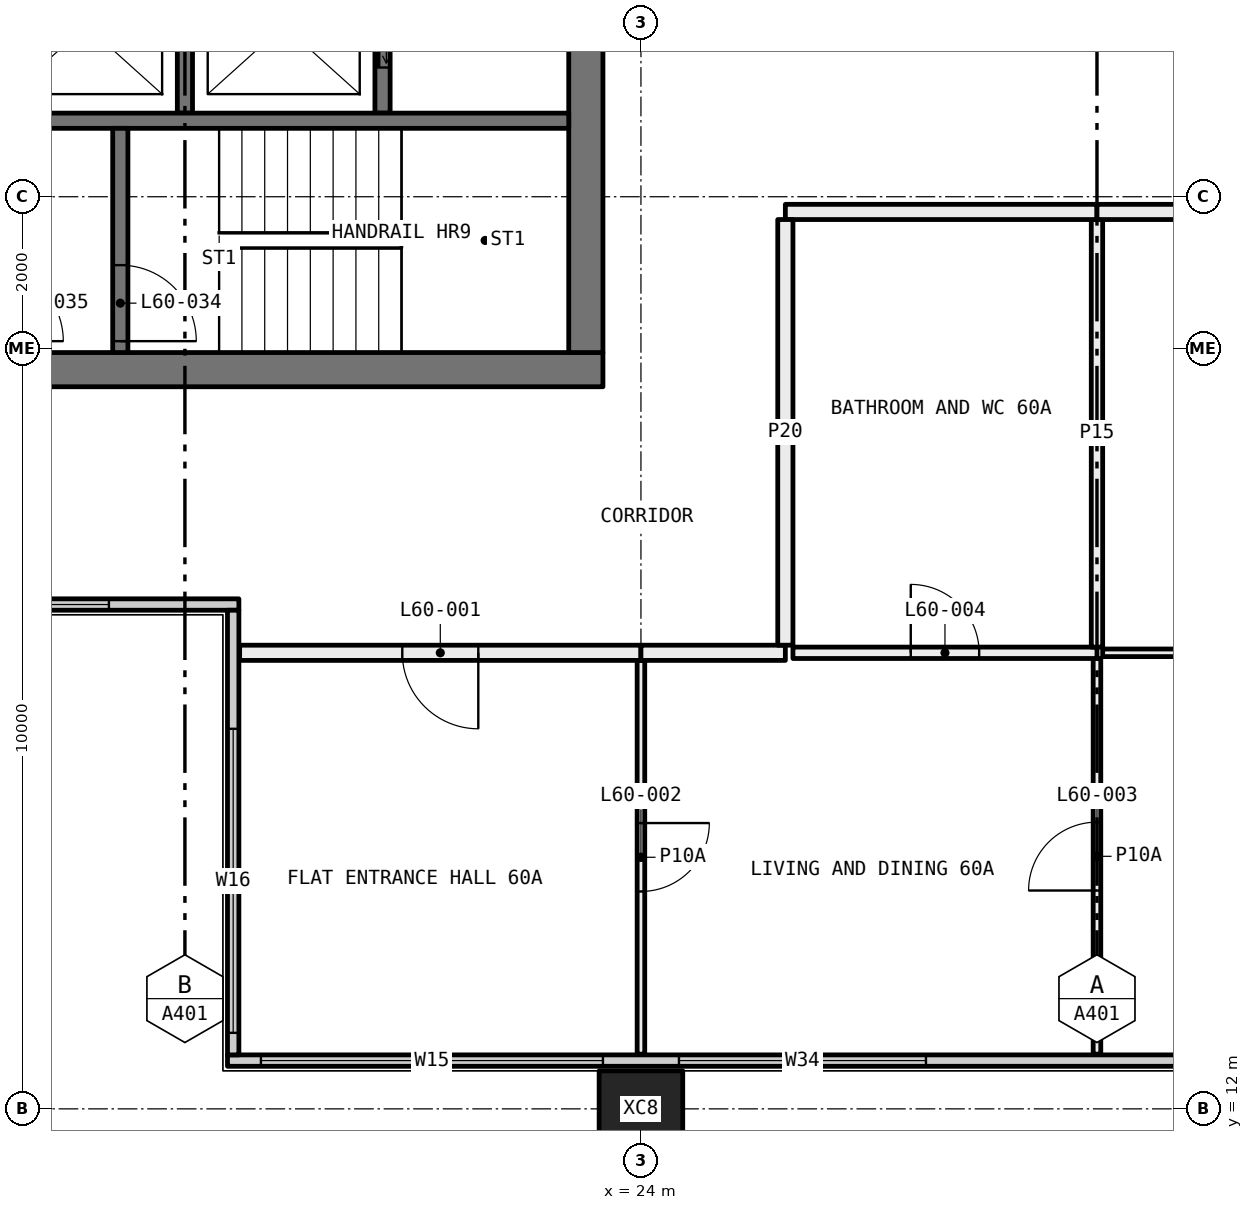
"""IFC4 building model, lengths in metres.
Left out: names, types, materials, properties, quantities, classifications, styles, units other than length and angle.
Written with IfcOpenShell. Run it as: python <this file> out.ifc"""

import sys

from ifc_helpers import new_model, si_unit, direction, frame, frame_2d, origin, origin_2d, place, context, subcontext, project, spatial, rectangle, hollow_rectangle, extrude, element, fill, save


model = new_model("IFC4")
c1 = context("Model", 3, precision=1e-05, world=origin(), true_north=direction((0.0, 1.0)))
c2 = subcontext(c1, "Body", "Model", "MODEL_VIEW")
j1 = project(units=[si_unit("LENGTHUNIT", "METRE"), si_unit("PLANEANGLEUNIT", "RADIAN")], contexts=[c1])
p1 = place(None, origin())
s1 = spatial("IfcSite", under=j1, at=p1, CompositionType="ELEMENT")
p2 = place(p1, origin())
s2 = spatial("IfcBuilding", under=s1, at=p2, CompositionType="ELEMENT")
p3 = place(p2, frame((0.0, 0.0, 224.85)))
s3 = spatial("IfcBuildingStorey", under=s2, at=p3, CompositionType="ELEMENT", Elevation=224.85)
p4 = place(p3, frame((24.0, 12.0, -0.4), z_axis=(0.0, 0.0, 1.0), x_axis=(1.0, 0.0, 0.0)))
e1 = element("IfcColumn", 1, at=p4, inside=s3, PredefinedType="COLUMN", context=c2, shape_type="SweptSolid", body=[
    extrude(hollow_rectangle(XDim=1.1, YDim=1.0, WallThickness=0.04, at=origin_2d()), origin(), (0.0, 0.0, 1.0), 3.45),
])
p5 = place(p3, frame((18.56, 12.635, 0.0), z_axis=(0.0, 0.0, 1.0), x_axis=(1.0, 0.0, 0.0)))
e2 = element("IfcWall", 2, at=p5, inside=s3, PredefinedType="ELEMENTEDWALL", context=c2, shape_type="SweptSolid", body=[
    extrude(rectangle(XDim=34.88, YDim=0.15, at=frame_2d((17.44, 0.0))), origin(), (0.0, 0.0, 1.0), 3.05),
])
p6 = place(p5, frame((0.44, 0.0, 0.45)))
e3 = element("IfcOpeningElement", 3, at=p6, cuts=e2, PredefinedType="OPENING", context=c2, shape_type="SweptSolid", body=[
    extrude(rectangle(XDim=4.5, YDim=2.55, at=frame_2d((2.25, 1.275))), frame((0.0, 0.085, 0.0), z_axis=(0.0, -1.0, 0.0), x_axis=(1.0, 0.0, 0.0)), (0.0, 0.0, 1.0), 0.17),
])
p7 = place(p5, frame((5.94, 0.0, 0.45)))
e4 = element("IfcOpeningElement", 4, at=p7, cuts=e2, PredefinedType="OPENING", context=c2, shape_type="SweptSolid", body=[
    extrude(rectangle(XDim=3.25, YDim=2.55, at=frame_2d((1.625, 1.275))), frame((0.0, 0.085, 0.0), z_axis=(0.0, -1.0, 0.0), x_axis=(1.0, 0.0, 0.0)), (0.0, 0.0, 1.0), 0.17),
])
p8 = place(p5, frame((14.94, 0.0, 0.45)))
e5 = element("IfcOpeningElement", 5, at=p8, cuts=e2, PredefinedType="OPENING", context=c2, shape_type="SweptSolid", body=[
    extrude(rectangle(XDim=2.0, YDim=2.55, at=frame_2d((1.0, 1.275))), frame((0.0, 0.085, 0.0), z_axis=(0.0, -1.0, 0.0), x_axis=(1.0, 0.0, 0.0)), (0.0, 0.0, 1.0), 0.17),
])
p9 = place(p5, frame((17.94, 0.0, 0.45)))
e6 = element("IfcOpeningElement", 6, at=p9, cuts=e2, PredefinedType="OPENING", context=c2, shape_type="SweptSolid", body=[
    extrude(rectangle(XDim=3.25, YDim=2.55, at=frame_2d((1.625, 1.275))), frame((0.0, 0.085, 0.0), z_axis=(0.0, -1.0, 0.0), x_axis=(1.0, 0.0, 0.0)), (0.0, 0.0, 1.0), 0.17),
])
p10 = place(p5, frame((25.69, 0.0, 0.45)))
e7 = element("IfcOpeningElement", 7, at=p10, cuts=e2, PredefinedType="OPENING", context=c2, shape_type="SweptSolid", body=[
    extrude(rectangle(XDim=3.25, YDim=2.55, at=frame_2d((1.625, 1.275))), frame((0.0, 0.085, 0.0), z_axis=(0.0, -1.0, 0.0), x_axis=(1.0, 0.0, 0.0)), (0.0, 0.0, 1.0), 0.17),
])
p11 = place(p5, frame((29.94, 0.0, 0.45)))
e8 = element("IfcOpeningElement", 8, at=p11, cuts=e2, PredefinedType="OPENING", context=c2, shape_type="SweptSolid", body=[
    extrude(rectangle(XDim=4.5, YDim=2.55, at=frame_2d((2.25, 1.275))), frame((0.0, 0.085, 0.0), z_axis=(0.0, -1.0, 0.0), x_axis=(1.0, 0.0, 0.0)), (0.0, 0.0, 1.0), 0.17),
])
p12 = place(p3, frame((12.56, 18.635, 0.0), z_axis=(0.0, 0.0, 1.0), x_axis=(1.0, 0.0, 0.0)))
e9 = element("IfcWall", 9, at=p12, inside=s3, PredefinedType="ELEMENTEDWALL", context=c2, shape_type="SweptSolid", body=[
    extrude(rectangle(XDim=6.15, YDim=0.15, at=frame_2d((3.075, 0.0))), origin(), (0.0, 0.0, 1.0), 3.05),
])
p13 = place(p12, frame((0.44, 0.0, 0.45)))
e10 = element("IfcOpeningElement", 10, at=p13, cuts=e9, PredefinedType="OPENING", context=c2, shape_type="SweptSolid", body=[
    extrude(rectangle(XDim=4.0, YDim=2.55, at=frame_2d((2.0, 1.275))), frame((0.0, 0.085, 0.0), z_axis=(0.0, -1.0, 0.0), x_axis=(1.0, 0.0, 0.0)), (0.0, 0.0, 1.0), 0.17),
])
p14 = place(p3, frame((18.635, 12.71, 0.0), z_axis=(0.0, 0.0, 1.0), x_axis=(0.0, 1.0, 0.0)))
e11 = element("IfcWall", 11, at=p14, inside=s3, PredefinedType="ELEMENTEDWALL", context=c2, shape_type="SweptSolid", body=[
    extrude(rectangle(XDim=5.85, YDim=0.15, at=frame_2d((2.925, 0.0))), origin(), (0.0, 0.0, 1.0), 3.05),
])
p15 = place(p14, frame((0.29, 0.0, 0.45)))
e12 = element("IfcOpeningElement", 12, at=p15, cuts=e11, PredefinedType="OPENING", context=c2, shape_type="SweptSolid", body=[
    extrude(rectangle(XDim=4.0, YDim=2.55, at=frame_2d((2.0, 1.275))), frame((0.0, 0.085, 0.0), z_axis=(0.0, -1.0, 0.0), x_axis=(1.0, 0.0, 0.0)), (0.0, 0.0, 1.0), 0.17),
])
p16 = place(p3, frame((24.0, 12.72, 0.0), z_axis=(0.0, 0.0, 1.0), x_axis=(0.0, 1.0, 0.0)))
e13 = element("IfcWall", 13, at=p16, inside=s3, PredefinedType="PARTITIONING", context=c2, shape_type="SweptSolid", body=[
    extrude(rectangle(XDim=5.18, YDim=0.1, at=frame_2d((2.59, 0.0))), origin(), (0.0, 0.0, 1.0), 3.05),
])
p17 = place(p16, frame((2.14, 0.0, 0.0)))
e14 = element("IfcOpeningElement", 14, at=p17, cuts=e13, PredefinedType="OPENING", context=c2, shape_type="SweptSolid", body=[
    extrude(rectangle(XDim=0.9, YDim=2.1, at=frame_2d((0.45, 1.05))), frame((0.0, 0.06, 0.0), z_axis=(0.0, -1.0, 0.0), x_axis=(1.0, 0.0, 0.0)), (0.0, 0.0, 1.0), 0.12),
])
p18 = place(p3, frame((24.0, 18.0, 0.0), z_axis=(0.0, 0.0, 1.0), x_axis=(-1.0, 0.0, 0.0)))
e15 = element("IfcWall", 15, at=p18, inside=s3, PredefinedType="PARTITIONING", context=c2, shape_type="SweptSolid", body=[
    extrude(rectangle(XDim=5.28, YDim=0.2, at=frame_2d((2.64, 0.0))), origin(), (0.0, 0.0, 1.0), 3.05),
])
p19 = place(p18, frame((2.14, 0.0, 0.0)))
e16 = element("IfcOpeningElement", 16, at=p19, cuts=e15, PredefinedType="OPENING", context=c2, shape_type="SweptSolid", body=[
    extrude(rectangle(XDim=1.0, YDim=2.1, at=frame_2d((0.5, 1.05))), frame((0.0, 0.11, 0.0), z_axis=(0.0, -1.0, 0.0), x_axis=(1.0, 0.0, 0.0)), (0.0, 0.0, 1.0), 0.22),
])
p20 = place(p3, frame((30.0, 12.72, 0.0), z_axis=(0.0, 0.0, 1.0), x_axis=(0.0, 1.0, 0.0)))
e17 = element("IfcWall", 17, at=p20, inside=s3, PredefinedType="PARTITIONING", context=c2, shape_type="SweptSolid", body=[
    extrude(rectangle(XDim=5.205, YDim=0.1, at=frame_2d((2.603, 0.0))), origin(), (0.0, 0.0, 1.0), 3.05),
])
p21 = place(p20, frame((2.153, 0.0, 0.0)))
e18 = element("IfcOpeningElement", 18, at=p21, cuts=e17, PredefinedType="OPENING", context=c2, shape_type="SweptSolid", body=[
    extrude(rectangle(XDim=0.9, YDim=2.1, at=frame_2d((0.45, 1.05))), frame((0.0, 0.06, 0.0), z_axis=(0.0, -1.0, 0.0), x_axis=(1.0, 0.0, 0.0)), (0.0, 0.0, 1.0), 0.12),
])
p22 = place(p3, frame((30.0, 18.0, 0.0), z_axis=(0.0, 0.0, 1.0), x_axis=(-1.0, 0.0, 0.0)))
e19 = element("IfcWall", 19, at=p22, inside=s3, PredefinedType="PARTITIONING", context=c2, shape_type="SweptSolid", body=[
    extrude(rectangle(XDim=4.0, YDim=0.15, at=frame_2d((2.0, 0.0))), origin(), (0.0, 0.0, 1.0), 3.05),
])
p23 = place(p22, frame((1.55, 0.0, 0.0)))
e20 = element("IfcOpeningElement", 20, at=p23, cuts=e19, PredefinedType="OPENING", context=c2, shape_type="SweptSolid", body=[
    extrude(rectangle(XDim=0.9, YDim=2.1, at=frame_2d((0.45, 1.05))), frame((0.0, 0.085, 0.0), z_axis=(0.0, -1.0, 0.0), x_axis=(1.0, 0.0, 0.0)), (0.0, 0.0, 1.0), 0.17),
])
p24 = place(p3, frame((25.9, 18.0, 0.0), z_axis=(0.0, 0.0, 1.0), x_axis=(-1.0, 0.0, 0.0)))
e21 = element("IfcWall", 21, at=p24, inside=s3, PredefinedType="PARTITIONING", context=c2, shape_type="SweptSolid", body=[
    extrude(rectangle(XDim=1.9, YDim=0.2, at=frame_2d((0.95, 0.0))), origin(), (0.0, 0.0, 1.0), 3.05),
])
p25 = place(p3, frame((34.5, 18.0, 0.0), z_axis=(0.0, 0.0, 1.0), x_axis=(-1.0, 0.0, 0.0)))
e22 = element("IfcWall", 22, at=p25, inside=s3, PredefinedType="PARTITIONING", context=c2, shape_type="SweptSolid", body=[
    extrude(rectangle(XDim=4.425, YDim=0.1, at=frame_2d((2.212, 0.0))), origin(), (0.0, 0.0, 1.0), 3.05),
])
p26 = place(p25, frame((1.762, 0.0, 0.0)))
e23 = element("IfcOpeningElement", 23, at=p26, cuts=e22, PredefinedType="OPENING", context=c2, shape_type="SweptSolid", body=[
    extrude(rectangle(XDim=0.9, YDim=2.1, at=frame_2d((0.45, 1.05))), frame((0.0, 0.06, 0.0), z_axis=(0.0, -1.0, 0.0), x_axis=(1.0, 0.0, 0.0)), (0.0, 0.0, 1.0), 0.12),
])
p27 = place(p3, frame((30.0, 18.075, 0.0), z_axis=(0.0, 0.0, 1.0), x_axis=(0.0, 1.0, 0.0)))
e24 = element("IfcWall", 24, at=p27, inside=s3, PredefinedType="PARTITIONING", context=c2, shape_type="SweptSolid", body=[
    extrude(rectangle(XDim=5.625, YDim=0.15, at=frame_2d((2.812, 0.0))), origin(), (0.0, 0.0, 1.0), 3.05),
])
p28 = place(p3, frame((30.0, 23.8, 0.0), z_axis=(0.0, 0.0, 1.0), x_axis=(-1.0, 0.0, 0.0)))
e25 = element("IfcWall", 25, at=p28, inside=s3, PredefinedType="PARTITIONING", context=c2, shape_type="SweptSolid", body=[
    extrude(rectangle(XDim=4.1, YDim=0.2, at=frame_2d((2.05, 0.0))), origin(), (0.0, 0.0, 1.0), 3.05),
])
p29 = place(p3, frame((25.9, 23.7, 0.0), z_axis=(0.0, 0.0, 1.0), x_axis=(0.0, -1.0, 0.0)))
e26 = element("IfcWall", 26, at=p29, inside=s3, PredefinedType="PARTITIONING", context=c2, shape_type="SweptSolid", body=[
    extrude(rectangle(XDim=5.6, YDim=0.2, at=frame_2d((2.8, 0.0))), origin(), (0.0, 0.0, 1.0), 3.05),
])
p30 = place(p3, frame((34.5, 23.8, 0.0), z_axis=(0.0, 0.0, 1.0), x_axis=(-1.0, 0.0, 0.0)))
e27 = element("IfcWall", 27, at=p30, inside=s3, PredefinedType="PARTITIONING", context=c2, shape_type="SweptSolid", body=[
    extrude(rectangle(XDim=4.5, YDim=0.2, at=frame_2d((2.25, 0.0))), origin(), (0.0, 0.0, 1.0), 3.05),
])
p31 = place(p3, frame((12.5, 21.725, 0.0), z_axis=(0.0, 0.0, 1.0), x_axis=(1.0, 0.0, 0.0)))
e28 = element("IfcWall", 28, at=p31, inside=s3, PredefinedType="SHEAR", context=c2, shape_type="SweptSolid", body=[
    extrude(rectangle(XDim=11.0, YDim=0.45, at=frame_2d((5.5, 0.0))), origin(), (0.0, 0.0, 1.0), 3.05),
])
p32 = place(p31, frame((1.125, 0.0, 0.0)))
e29 = element("IfcOpeningElement", 29, at=p32, cuts=e28, PredefinedType="OPENING", context=c2, shape_type="SweptSolid", body=[
    extrude(rectangle(XDim=1.0, YDim=2.1, at=frame_2d((0.5, 1.05))), frame((0.0, 0.235, 0.0), z_axis=(0.0, -1.0, 0.0), x_axis=(1.0, 0.0, 0.0)), (0.0, 0.0, 1.0), 0.47),
])
p33 = place(p3, frame((23.275, 21.95, 0.0), z_axis=(0.0, 0.0, 1.0), x_axis=(0.0, 1.0, 0.0)))
e30 = element("IfcWall", 30, at=p33, inside=s3, PredefinedType="SHEAR", context=c2, shape_type="SweptSolid", body=[
    extrude(rectangle(XDim=16.1, YDim=0.45, at=frame_2d((8.05, 0.0))), origin(), (0.0, 0.0, 1.0), 3.05),
])
p34 = place(p33, frame((7.25, 0.0, 0.0)))
e31 = element("IfcOpeningElement", 31, at=p34, cuts=e30, PredefinedType="OPENING", context=c2, shape_type="SweptSolid", body=[
    extrude(rectangle(XDim=1.6, YDim=2.1, at=frame_2d((0.8, 1.05))), frame((0.0, 0.235, 0.0), z_axis=(0.0, -1.0, 0.0), x_axis=(1.0, 0.0, 0.0)), (0.0, 0.0, 1.0), 0.47),
])
p35 = place(p3, frame((20.6, 25.1, 0.0), z_axis=(0.0, 0.0, 1.0), x_axis=(0.0, 1.0, 0.0)))
e32 = element("IfcWall", 32, at=p35, inside=s3, PredefinedType="SOLIDWALL", context=c2, shape_type="SweptSolid", body=[
    extrude(rectangle(XDim=12.95, YDim=0.2, at=frame_2d((6.475, 0.0))), origin(), (0.0, 0.0, 1.0), 3.05),
])
p36 = place(p35, frame((0.6, 0.0, 0.0)))
e33 = element("IfcOpeningElement", 33, at=p36, cuts=e32, PredefinedType="OPENING", context=c2, shape_type="SweptSolid", body=[
    extrude(rectangle(XDim=1.1, YDim=2.1, at=frame_2d((0.55, 1.05))), frame((0.0, 0.11, 0.0), z_axis=(0.0, -1.0, 0.0), x_axis=(1.0, 0.0, 0.0)), (0.0, 0.0, 1.0), 0.22),
])
p37 = place(p35, frame((3.1, 0.0, 0.0)))
e34 = element("IfcOpeningElement", 34, at=p37, cuts=e32, PredefinedType="OPENING", context=c2, shape_type="SweptSolid", body=[
    extrude(rectangle(XDim=1.1, YDim=2.1, at=frame_2d((0.55, 1.05))), frame((0.0, 0.11, 0.0), z_axis=(0.0, -1.0, 0.0), x_axis=(1.0, 0.0, 0.0)), (0.0, 0.0, 1.0), 0.22),
])
p38 = place(p35, frame((5.6, 0.0, 0.0)))
e35 = element("IfcOpeningElement", 35, at=p38, cuts=e32, PredefinedType="OPENING", context=c2, shape_type="SweptSolid", body=[
    extrude(rectangle(XDim=1.1, YDim=2.1, at=frame_2d((0.55, 1.05))), frame((0.0, 0.11, 0.0), z_axis=(0.0, -1.0, 0.0), x_axis=(1.0, 0.0, 0.0)), (0.0, 0.0, 1.0), 0.22),
])
p39 = place(p35, frame((8.1, 0.0, 0.0)))
e36 = element("IfcOpeningElement", 36, at=p39, cuts=e32, PredefinedType="OPENING", context=c2, shape_type="SweptSolid", body=[
    extrude(rectangle(XDim=1.1, YDim=2.1, at=frame_2d((0.55, 1.05))), frame((0.0, 0.11, 0.0), z_axis=(0.0, -1.0, 0.0), x_axis=(1.0, 0.0, 0.0)), (0.0, 0.0, 1.0), 0.22),
])
p40 = place(p35, frame((10.975, 0.0, 0.0)))
e37 = element("IfcOpeningElement", 37, at=p40, cuts=e32, PredefinedType="OPENING", context=c2, shape_type="SweptSolid", body=[
    extrude(rectangle(XDim=1.0, YDim=2.1, at=frame_2d((0.5, 1.05))), frame((0.0, 0.11, 0.0), z_axis=(0.0, -1.0, 0.0), x_axis=(1.0, 0.0, 0.0)), (0.0, 0.0, 1.0), 0.22),
])
p41 = place(p3, frame((18.0, 25.1, 0.0), z_axis=(0.0, 0.0, 1.0), x_axis=(0.0, 1.0, 0.0)))
e38 = element("IfcWall", 38, at=p41, inside=s3, PredefinedType="SOLIDWALL", context=c2, shape_type="SweptSolid", body=[
    extrude(rectangle(XDim=9.8, YDim=0.2, at=frame_2d((4.9, 0.0))), origin(), (0.0, 0.0, 1.0), 3.05),
])
p42 = place(p3, frame((15.5, 25.0, 0.0), z_axis=(0.0, 0.0, 1.0), x_axis=(1.0, 0.0, 0.0)))
e39 = element("IfcWall", 39, at=p42, inside=s3, PredefinedType="SOLIDWALL", context=c2, shape_type="SweptSolid", body=[
    extrude(rectangle(XDim=7.55, YDim=0.2, at=frame_2d((3.775, 0.0))), origin(), (0.0, 0.0, 1.0), 3.05),
])
p43 = place(p3, frame((17.15, 21.95, 0.0), z_axis=(0.0, 0.0, 1.0), x_axis=(0.0, 1.0, 0.0)))
e40 = element("IfcWall", 40, at=p43, inside=s3, PredefinedType="SOLIDWALL", context=c2, shape_type="SweptSolid", body=[
    extrude(rectangle(XDim=2.95, YDim=0.2, at=frame_2d((1.475, 0.0))), origin(), (0.0, 0.0, 1.0), 3.05),
])
p44 = place(p43, frame((0.15, 0.0, 0.0)))
e41 = element("IfcOpeningElement", 41, at=p44, cuts=e40, PredefinedType="OPENING", context=c2, shape_type="SweptSolid", body=[
    extrude(rectangle(XDim=1.0, YDim=2.1, at=frame_2d((0.5, 1.05))), frame((0.0, 0.11, 0.0), z_axis=(0.0, -1.0, 0.0), x_axis=(1.0, 0.0, 0.0)), (0.0, 0.0, 1.0), 0.22),
])
p45 = place(p6, origin())
e42 = element("IfcWindow", 42, at=p45, inside=s3, PartitioningType="SINGLE_PANEL", PredefinedType="WINDOW", context=c2, shape_type="SweptSolid", body=[
    extrude(rectangle(XDim=4.5, YDim=2.55, at=frame_2d((2.25, 1.275))), frame((0.0, 0.03, 0.0), z_axis=(0.0, -1.0, 0.0), x_axis=(1.0, 0.0, 0.0)), (0.0, 0.0, 1.0), 0.06),
])
fill(e3, e42)
p46 = place(p7, origin())
e43 = element("IfcWindow", 43, at=p46, inside=s3, PartitioningType="SINGLE_PANEL", PredefinedType="WINDOW", context=c2, shape_type="SweptSolid", body=[
    extrude(rectangle(XDim=3.25, YDim=2.55, at=frame_2d((1.625, 1.275))), frame((0.0, 0.03, 0.0), z_axis=(0.0, -1.0, 0.0), x_axis=(1.0, 0.0, 0.0)), (0.0, 0.0, 1.0), 0.06),
])
fill(e4, e43)
p47 = place(p13, origin())
e44 = element("IfcWindow", 44, at=p47, inside=s3, PartitioningType="SINGLE_PANEL", PredefinedType="WINDOW", context=c2, shape_type="SweptSolid", body=[
    extrude(rectangle(XDim=4.0, YDim=2.55, at=frame_2d((2.0, 1.275))), frame((0.0, 0.03, 0.0), z_axis=(0.0, -1.0, 0.0), x_axis=(1.0, 0.0, 0.0)), (0.0, 0.0, 1.0), 0.06),
])
fill(e10, e44)
p48 = place(p15, origin())
e45 = element("IfcWindow", 45, at=p48, inside=s3, PartitioningType="SINGLE_PANEL", PredefinedType="WINDOW", context=c2, shape_type="SweptSolid", body=[
    extrude(rectangle(XDim=4.0, YDim=2.55, at=frame_2d((2.0, 1.275))), frame((0.0, 0.03, 0.0), z_axis=(0.0, -1.0, 0.0), x_axis=(1.0, 0.0, 0.0)), (0.0, 0.0, 1.0), 0.06),
])
fill(e12, e45)
p49 = place(p19, origin())
e46 = element("IfcDoor", 46, at=p49, inside=s3, OperationType="SINGLE_SWING_RIGHT", PredefinedType="DOOR", context=c2, shape_type="SweptSolid", body=[
    extrude(rectangle(XDim=1.0, YDim=2.1, at=frame_2d((0.5, 1.05))), frame((0.0, 0.025, 0.0), z_axis=(0.0, -1.0, 0.0), x_axis=(1.0, 0.0, 0.0)), (0.0, 0.0, 1.0), 0.05),
])
fill(e16, e46)
p50 = place(p17, frame((0.9, 0.0, 0.0), x_axis=(-1.0, 0.0, 0.0)))
e47 = element("IfcDoor", 47, at=p50, inside=s3, OperationType="SINGLE_SWING_RIGHT", PredefinedType="DOOR", context=c2, shape_type="SweptSolid", body=[
    extrude(rectangle(XDim=0.9, YDim=2.1, at=frame_2d((0.45, 1.05))), frame((0.0, 0.025, 0.0), z_axis=(0.0, -1.0, 0.0), x_axis=(1.0, 0.0, 0.0)), (0.0, 0.0, 1.0), 0.05),
])
fill(e14, e47)
p51 = place(p21, origin())
e48 = element("IfcDoor", 48, at=p51, inside=s3, OperationType="SINGLE_SWING_RIGHT", PredefinedType="DOOR", context=c2, shape_type="SweptSolid", body=[
    extrude(rectangle(XDim=0.9, YDim=2.1, at=frame_2d((0.45, 1.05))), frame((0.0, 0.025, 0.0), z_axis=(0.0, -1.0, 0.0), x_axis=(1.0, 0.0, 0.0)), (0.0, 0.0, 1.0), 0.05),
])
fill(e18, e48)
p52 = place(p23, frame((0.9, 0.0, 0.0), x_axis=(-1.0, 0.0, 0.0)))
e49 = element("IfcDoor", 49, at=p52, inside=s3, OperationType="SINGLE_SWING_RIGHT", PredefinedType="DOOR", context=c2, shape_type="SweptSolid", body=[
    extrude(rectangle(XDim=0.9, YDim=2.1, at=frame_2d((0.45, 1.05))), frame((0.0, 0.025, 0.0), z_axis=(0.0, -1.0, 0.0), x_axis=(1.0, 0.0, 0.0)), (0.0, 0.0, 1.0), 0.05),
])
fill(e20, e49)
p53 = place(p36, origin())
e50 = element("IfcDoor", 50, at=p53, inside=s3, OperationType="SLIDING_TO_LEFT", PredefinedType="DOOR", context=c2, shape_type="SweptSolid", body=[
    extrude(rectangle(XDim=1.1, YDim=2.1, at=frame_2d((0.55, 1.05))), frame((0.0, 0.025, 0.0), z_axis=(0.0, -1.0, 0.0), x_axis=(1.0, 0.0, 0.0)), (0.0, 0.0, 1.0), 0.05),
])
fill(e33, e50)
p54 = place(p44, frame((1.0, 0.0, 0.0), x_axis=(-1.0, 0.0, 0.0)))
e51 = element("IfcDoor", 51, at=p54, inside=s3, OperationType="SINGLE_SWING_LEFT", PredefinedType="DOOR", context=c2, shape_type="SweptSolid", body=[
    extrude(rectangle(XDim=1.0, YDim=2.1, at=frame_2d((0.5, 1.05))), frame((0.0, 0.025, 0.0), z_axis=(0.0, -1.0, 0.0), x_axis=(1.0, 0.0, 0.0)), (0.0, 0.0, 1.0), 0.05),
])
fill(e41, e51)
save(model, sys.argv[1])
